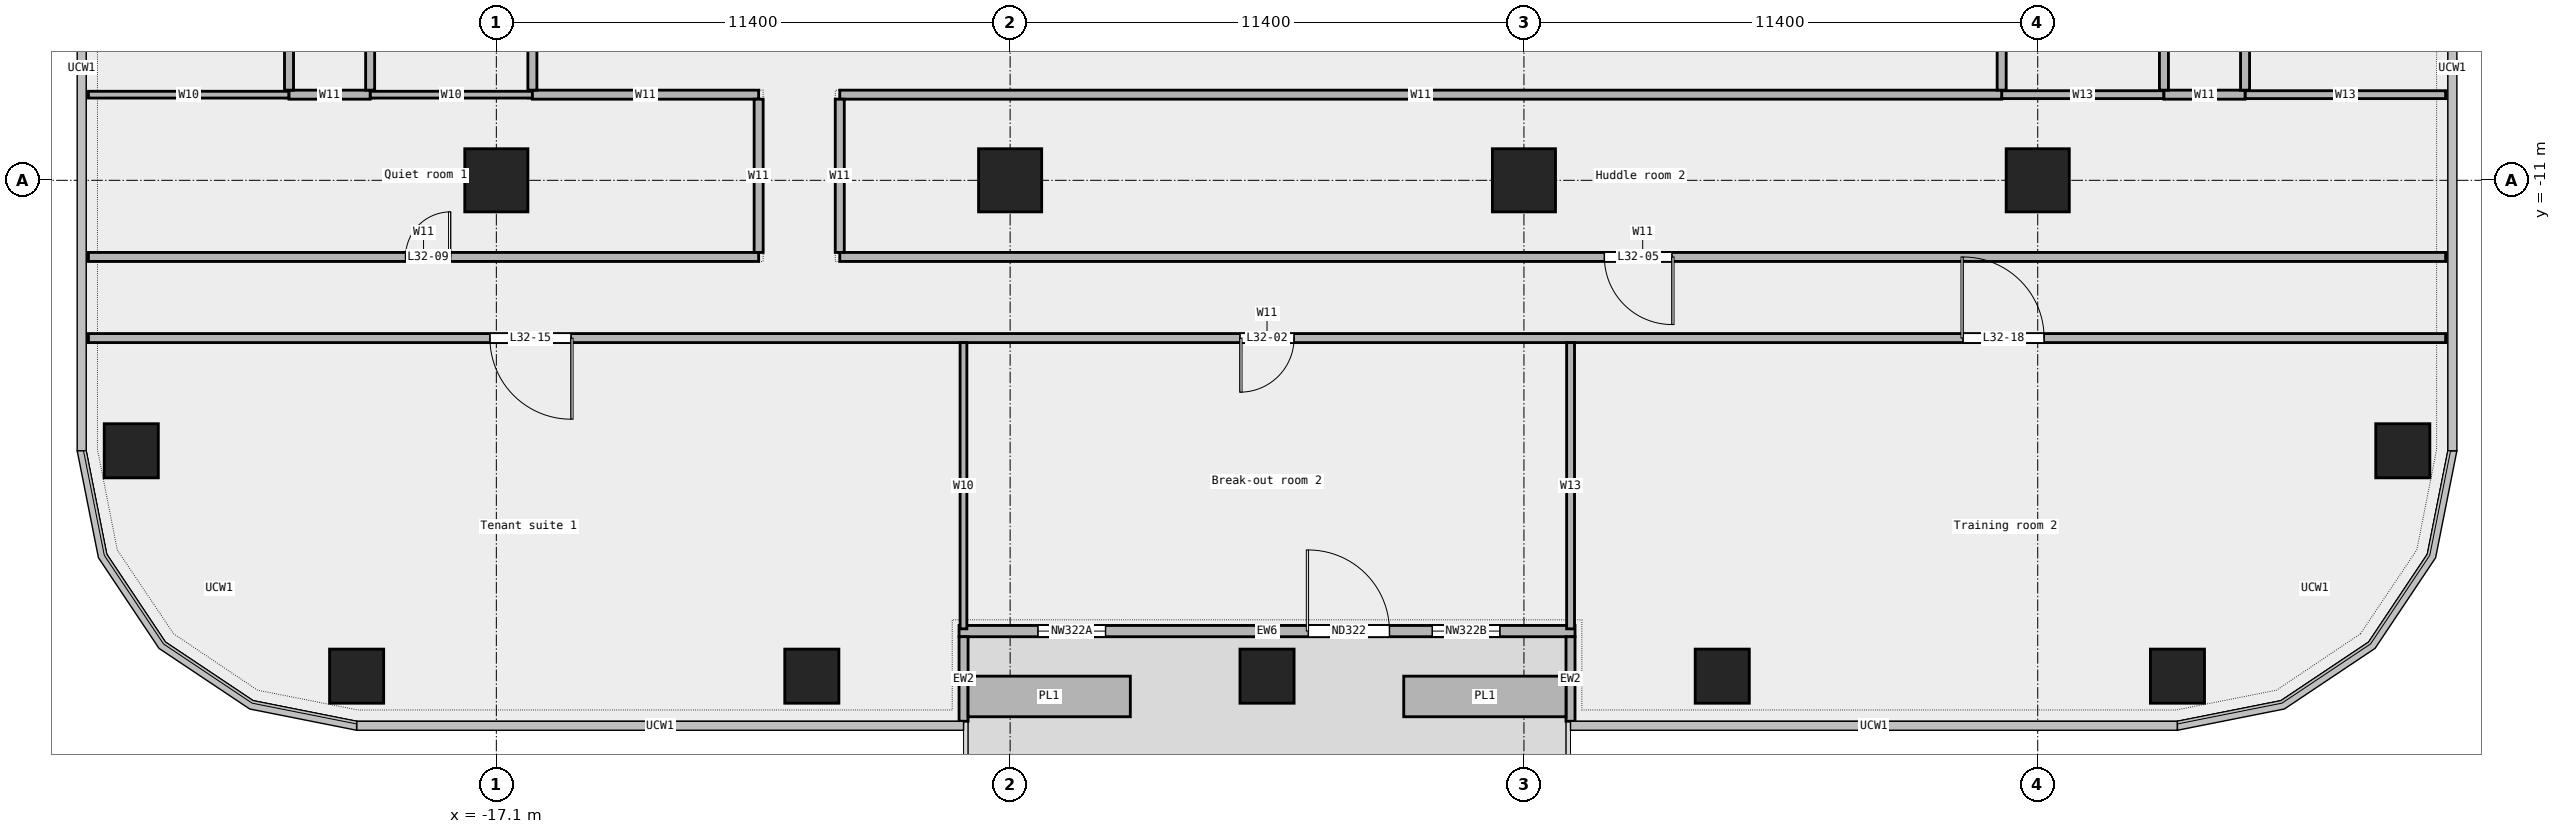
"""IFC4 building model, lengths in metres.
Left out: names, types, materials, properties, quantities, classifications, styles, units other than length and angle.
Written with IfcOpenShell. Run it as: python <this file> out.ifc"""

import sys

from ifc_helpers import new_model, si_unit, direction, frame, frame_2d, origin, origin_2d, place, context, subcontext, project, spatial, rectangle, extrude, element, fill, save


model = new_model("IFC4")
c1 = context("Model", 3, precision=1e-05, world=origin(), true_north=direction((0.0, 1.0)))
c2 = subcontext(c1, "Body", "Model", "MODEL_VIEW")
j1 = project(units=[si_unit("LENGTHUNIT", "METRE"), si_unit("PLANEANGLEUNIT", "RADIAN")], contexts=[c1])
p1 = place(None, origin())
s1 = spatial("IfcSite", under=j1, at=p1, CompositionType="ELEMENT")
p2 = place(p1, origin())
s2 = spatial("IfcBuilding", under=s1, at=p2, CompositionType="ELEMENT")
p3 = place(p2, frame((0.0, 0.0, 161.0)))
s3 = spatial("IfcBuildingStorey", under=s2, at=p3, CompositionType="ELEMENT", Elevation=161.0)
for number, where, z_axis, x_axis in (
    (1, (-20.2, -22.0, 0.0), (0.0, 0.0, 1.0), (1.0, 0.0, 0.0)),
    (2, (-10.1, -22.0, 0.0), (0.0, 0.0, 1.0), (1.0, 0.0, 0.0)),
    (3, (0.0, -22.0, 0.0), (0.0, 0.0, 1.0), (1.0, 0.0, 0.0)),
    (4, (10.1, -22.0, 0.0), (0.0, 0.0, 1.0), (1.0, 0.0, 0.0)),
    (5, (20.2, -22.0, 0.0), (0.0, 0.0, 1.0), (1.0, 0.0, 0.0)),
    (6, (25.2, -17.0, 0.0), (0.0, 0.0, 1.0), (1.0, 0.0, 0.0)),
    (7, (-25.2, -17.0, 0.0), (0.0, 0.0, 1.0), (1.0, 0.0, 0.0)),
):
    element("IfcColumn", number, at=place(p3, frame(where, z_axis=z_axis, x_axis=x_axis)), inside=s3, PredefinedType="COLUMN", context=c2, shape_type="SweptSolid", body=[
        extrude(rectangle(XDim=1.2, YDim=1.2, at=origin_2d()), origin(), (0.0, 0.0, 1.0), 3.6),
    ])
for number, where, z_axis, x_axis in (
    (8, (-17.1, -11.0, 0.0), (0.0, 0.0, 1.0), (1.0, 0.0, 0.0)),
    (9, (-5.7, -11.0, 0.0), (0.0, 0.0, 1.0), (1.0, 0.0, 0.0)),
    (10, (5.7, -11.0, 0.0), (0.0, 0.0, 1.0), (1.0, 0.0, 0.0)),
    (11, (17.1, -11.0, 0.0), (0.0, 0.0, 1.0), (1.0, 0.0, 0.0)),
):
    element("IfcColumn", number, at=place(p3, frame(where, z_axis=z_axis, x_axis=x_axis)), inside=s3, PredefinedType="COLUMN", context=c2, shape_type="SweptSolid", body=[
        extrude(rectangle(XDim=1.4, YDim=1.4, at=origin_2d()), origin(), (0.0, 0.0, 1.0), 3.6),
    ])
p4 = place(p3, frame((-6.833, -21.0, 0.0), z_axis=(0.0, 0.0, 1.0), x_axis=(1.0, 0.0, 0.0)))
e12 = element("IfcWall", 12, at=p4, inside=s3, PredefinedType="STANDARD", context=c2, shape_type="SweptSolid", body=[
    extrude(rectangle(XDim=13.667, YDim=0.25, at=frame_2d((6.833, 0.0))), origin(), (0.0, 0.0, 1.0), 3.6),
])
p5 = place(p4, frame((1.75, 0.0, 0.45)))
e13 = element("IfcOpeningElement", 13, at=p5, cuts=e12, PredefinedType="OPENING", context=c2, shape_type="SweptSolid", body=[
    extrude(rectangle(XDim=1.5, YDim=2.4, at=frame_2d((0.75, 1.2))), frame((0.0, 0.137, 0.0), z_axis=(0.0, -1.0, 0.0), x_axis=(1.0, 0.0, 0.0)), (0.0, 0.0, 1.0), 0.274),
])
p6 = place(p4, frame((7.75, 0.0, 0.0)))
e14 = element("IfcOpeningElement", 14, at=p6, cuts=e12, PredefinedType="OPENING", context=c2, shape_type="SweptSolid", body=[
    extrude(rectangle(XDim=1.8, YDim=2.4, at=frame_2d((0.9, 1.2))), frame((0.0, 0.137, 0.0), z_axis=(0.0, -1.0, 0.0), x_axis=(1.0, 0.0, 0.0)), (0.0, 0.0, 1.0), 0.274),
])
p7 = place(p4, frame((10.5, 0.0, 0.45)))
e15 = element("IfcOpeningElement", 15, at=p7, cuts=e12, PredefinedType="OPENING", context=c2, shape_type="SweptSolid", body=[
    extrude(rectangle(XDim=1.5, YDim=2.4, at=frame_2d((0.75, 1.2))), frame((0.0, 0.137, 0.0), z_axis=(0.0, -1.0, 0.0), x_axis=(1.0, 0.0, 0.0)), (0.0, 0.0, 1.0), 0.274),
])
for number, where, z_axis, x_axis in (
    (16, (-6.733, -23.0, 0.0), (0.0, 0.0, 1.0), (0.0, 1.0, 0.0)),
    (17, (6.733, -23.0, 0.0), (0.0, 0.0, 1.0), (0.0, 1.0, 0.0)),
):
    element("IfcWall", number, at=place(p3, frame(where, z_axis=z_axis, x_axis=x_axis)), inside=s3, PredefinedType="STANDARD", context=c2, shape_type="SweptSolid", body=[
        extrude(rectangle(XDim=1.875, YDim=0.2, at=frame_2d((0.938, 0.0))), origin(), (0.0, 0.0, 1.0), 3.6),
    ])
for number, where, z_axis, x_axis in (
    (18, (-6.633, -22.45, 0.0), (0.0, 0.0, 1.0), (1.0, 0.0, 0.0)),
    (19, (3.033, -22.45, 0.0), (0.0, 0.0, 1.0), (1.0, 0.0, 0.0)),
):
    element("IfcWall", number, at=place(p3, frame(where, z_axis=z_axis, x_axis=x_axis)), inside=s3, PredefinedType="STANDARD", context=c2, shape_type="SweptSolid", body=[
        extrude(rectangle(XDim=3.6, YDim=0.9, at=frame_2d((1.8, 0.0))), origin(), (0.0, 0.0, 1.0), 0.7),
    ])
p8 = place(p3, frame((-26.15, -14.5, 0.0), z_axis=(0.0, 0.0, 1.0), x_axis=(1.0, 0.0, 0.0)))
e20 = element("IfcWall", 20, at=p8, inside=s3, PredefinedType="PARTITIONING", context=c2, shape_type="SweptSolid", body=[
    extrude(rectangle(XDim=52.3, YDim=0.2, at=frame_2d((26.15, 0.0))), origin(), (0.0, 0.0, 1.0), 3.6),
])
p9 = place(p8, frame((25.55, 0.0, 0.0)))
e21 = element("IfcOpeningElement", 21, at=p9, cuts=e20, PredefinedType="OPENING", context=c2, shape_type="SweptSolid", body=[
    extrude(rectangle(XDim=1.2, YDim=2.1, at=frame_2d((0.6, 1.05))), frame((0.0, 0.112, 0.0), z_axis=(0.0, -1.0, 0.0), x_axis=(1.0, 0.0, 0.0)), (0.0, 0.0, 1.0), 0.224),
])
p10 = place(p8, frame((8.907, 0.0, 0.0)))
e22 = element("IfcOpeningElement", 22, at=p10, cuts=e20, PredefinedType="OPENING", context=c2, shape_type="SweptSolid", body=[
    extrude(rectangle(XDim=1.8, YDim=2.1, at=frame_2d((0.9, 1.05))), frame((0.0, 0.112, 0.0), z_axis=(0.0, -1.0, 0.0), x_axis=(1.0, 0.0, 0.0)), (0.0, 0.0, 1.0), 0.224),
])
p11 = place(p8, frame((41.593, 0.0, 0.0)))
e23 = element("IfcOpeningElement", 23, at=p11, cuts=e20, PredefinedType="OPENING", context=c2, shape_type="SweptSolid", body=[
    extrude(rectangle(XDim=1.8, YDim=2.1, at=frame_2d((0.9, 1.05))), frame((0.0, 0.112, 0.0), z_axis=(0.0, -1.0, 0.0), x_axis=(1.0, 0.0, 0.0)), (0.0, 0.0, 1.0), 0.224),
])
p12 = place(p3, frame((-26.15, -12.7, 0.0), z_axis=(0.0, 0.0, 1.0), x_axis=(1.0, 0.0, 0.0)))
e24 = element("IfcWall", 24, at=p12, inside=s3, PredefinedType="PARTITIONING", context=c2, shape_type="SweptSolid", body=[
    extrude(rectangle(XDim=14.87, YDim=0.2, at=frame_2d((7.435, 0.0))), origin(), (0.0, 0.0, 1.0), 3.6),
])
p13 = place(p12, frame((7.035, 0.0, 0.0)))
e25 = element("IfcOpeningElement", 25, at=p13, cuts=e24, PredefinedType="OPENING", context=c2, shape_type="SweptSolid", body=[
    extrude(rectangle(XDim=1.0, YDim=2.1, at=frame_2d((0.5, 1.05))), frame((0.0, 0.112, 0.0), z_axis=(0.0, -1.0, 0.0), x_axis=(1.0, 0.0, 0.0)), (0.0, 0.0, 1.0), 0.224),
])
p14 = place(p3, frame((-9.48, -12.7, 0.0), z_axis=(0.0, 0.0, 1.0), x_axis=(1.0, 0.0, 0.0)))
e26 = element("IfcWall", 26, at=p14, inside=s3, PredefinedType="PARTITIONING", context=c2, shape_type="SweptSolid", body=[
    extrude(rectangle(XDim=35.63, YDim=0.2, at=frame_2d((17.815, 0.0))), origin(), (0.0, 0.0, 1.0), 3.6),
])
p15 = place(p14, frame((16.965, 0.0, 0.0)))
e27 = element("IfcOpeningElement", 27, at=p15, cuts=e26, PredefinedType="OPENING", context=c2, shape_type="SweptSolid", body=[
    extrude(rectangle(XDim=1.5, YDim=2.1, at=frame_2d((0.75, 1.05))), frame((0.0, 0.112, 0.0), z_axis=(0.0, -1.0, 0.0), x_axis=(1.0, 0.0, 0.0)), (0.0, 0.0, 1.0), 0.224),
])
p16 = place(p3, frame((-26.15, -9.1, 0.0), z_axis=(0.0, 0.0, 1.0), x_axis=(1.0, 0.0, 0.0)))
e28 = element("IfcWall", 28, at=p16, inside=s3, PredefinedType="PARTITIONING", context=c2, shape_type="SweptSolid", body=[
    extrude(rectangle(XDim=4.45, YDim=0.15, at=frame_2d((2.225, 0.0))), origin(), (0.0, 0.0, 1.0), 3.6),
])
p17 = place(p3, frame((-19.9, -9.1, 0.0), z_axis=(0.0, 0.0, 1.0), x_axis=(1.0, 0.0, 0.0)))
e29 = element("IfcWall", 29, at=p17, inside=s3, PredefinedType="PARTITIONING", context=c2, shape_type="SweptSolid", body=[
    extrude(rectangle(XDim=3.6, YDim=0.15, at=frame_2d((1.8, 0.0))), origin(), (0.0, 0.0, 1.0), 3.6),
])
p18 = place(p3, frame((16.3, -9.1, 0.0), z_axis=(0.0, 0.0, 1.0), x_axis=(1.0, 0.0, 0.0)))
e30 = element("IfcWall", 30, at=p18, inside=s3, PredefinedType="PARTITIONING", context=c2, shape_type="SweptSolid", body=[
    extrude(rectangle(XDim=3.6, YDim=0.175, at=frame_2d((1.8, 0.0))), origin(), (0.0, 0.0, 1.0), 3.6),
])
p19 = place(p3, frame((21.7, -9.1, 0.0), z_axis=(0.0, 0.0, 1.0), x_axis=(1.0, 0.0, 0.0)))
e31 = element("IfcWall", 31, at=p19, inside=s3, PredefinedType="PARTITIONING", context=c2, shape_type="SweptSolid", body=[
    extrude(rectangle(XDim=4.45, YDim=0.175, at=frame_2d((2.225, 0.0))), origin(), (0.0, 0.0, 1.0), 3.6),
])
p20 = place(p3, frame((-21.7, -9.1, 0.0), z_axis=(0.0, 0.0, 1.0), x_axis=(1.0, 0.0, 0.0)))
e32 = element("IfcWall", 32, at=p20, inside=s3, PredefinedType="PARTITIONING", context=c2, shape_type="SweptSolid", body=[
    extrude(rectangle(XDim=1.8, YDim=0.2, at=frame_2d((0.9, 0.0))), origin(), (0.0, 0.0, 1.0), 3.6),
])
p21 = place(p3, frame((-16.3, -9.1, 0.0), z_axis=(0.0, 0.0, 1.0), x_axis=(1.0, 0.0, 0.0)))
e33 = element("IfcWall", 33, at=p21, inside=s3, PredefinedType="PARTITIONING", context=c2, shape_type="SweptSolid", body=[
    extrude(rectangle(XDim=5.02, YDim=0.2, at=frame_2d((2.51, 0.0))), origin(), (0.0, 0.0, 1.0), 3.6),
])
p22 = place(p3, frame((-9.48, -9.1, 0.0), z_axis=(0.0, 0.0, 1.0), x_axis=(1.0, 0.0, 0.0)))
e34 = element("IfcWall", 34, at=p22, inside=s3, PredefinedType="PARTITIONING", context=c2, shape_type="SweptSolid", body=[
    extrude(rectangle(XDim=25.78, YDim=0.2, at=frame_2d((12.89, 0.0))), origin(), (0.0, 0.0, 1.0), 3.6),
])
p23 = place(p3, frame((19.9, -9.1, 0.0), z_axis=(0.0, 0.0, 1.0), x_axis=(1.0, 0.0, 0.0)))
e35 = element("IfcWall", 35, at=p23, inside=s3, PredefinedType="PARTITIONING", context=c2, shape_type="SweptSolid", body=[
    extrude(rectangle(XDim=1.8, YDim=0.2, at=frame_2d((0.9, 0.0))), origin(), (0.0, 0.0, 1.0), 3.6),
])
p24 = place(p3, frame((-21.7, -9.0, 0.0), z_axis=(0.0, 0.0, 1.0), x_axis=(0.0, 1.0, 0.0)))
e36 = element("IfcWall", 36, at=p24, inside=s3, PredefinedType="PARTITIONING", context=c2, shape_type="SweptSolid", body=[
    extrude(rectangle(XDim=24.3, YDim=0.2, at=frame_2d((12.15, 0.0))), origin(), (0.0, 0.0, 1.0), 3.6),
])
p25 = place(p24, frame((14.925, 0.0, 0.0)))
e37 = element("IfcOpeningElement", 37, at=p25, cuts=e36, PredefinedType="OPENING", context=c2, shape_type="SweptSolid", body=[
    extrude(rectangle(XDim=0.9, YDim=2.1, at=frame_2d((0.45, 1.05))), frame((0.0, 0.112, 0.0), z_axis=(0.0, -1.0, 0.0), x_axis=(1.0, 0.0, 0.0)), (0.0, 0.0, 1.0), 0.224),
])
p26 = place(p24, frame((4.05, 0.0, 0.0)))
e38 = element("IfcOpeningElement", 38, at=p26, cuts=e36, PredefinedType="OPENING", context=c2, shape_type="SweptSolid", body=[
    extrude(rectangle(XDim=0.9, YDim=2.1, at=frame_2d((0.45, 1.05))), frame((0.0, 0.112, 0.0), z_axis=(0.0, -1.0, 0.0), x_axis=(1.0, 0.0, 0.0)), (0.0, 0.0, 1.0), 0.224),
])
p27 = place(p3, frame((-19.9, -9.0, 0.0), z_axis=(0.0, 0.0, 1.0), x_axis=(0.0, 1.0, 0.0)))
e39 = element("IfcWall", 39, at=p27, inside=s3, PredefinedType="PARTITIONING", context=c2, shape_type="SweptSolid", body=[
    extrude(rectangle(XDim=11.15, YDim=0.2, at=frame_2d((5.575, 0.0))), origin(), (0.0, 0.0, 1.0), 3.6),
])
p28 = place(p3, frame((-16.3, -9.0, 0.0), z_axis=(0.0, 0.0, 1.0), x_axis=(0.0, 1.0, 0.0)))
e40 = element("IfcWall", 40, at=p28, inside=s3, PredefinedType="PARTITIONING", context=c2, shape_type="SweptSolid", body=[
    extrude(rectangle(XDim=8.3, YDim=0.2, at=frame_2d((4.15, 0.0))), origin(), (0.0, 0.0, 1.0), 3.6),
])
p29 = place(p28, frame((6.823, 0.0, 0.0)))
e41 = element("IfcOpeningElement", 41, at=p29, cuts=e40, PredefinedType="OPENING", context=c2, shape_type="SweptSolid", body=[
    extrude(rectangle(XDim=0.9, YDim=2.1, at=frame_2d((0.45, 1.05))), frame((0.0, 0.112, 0.0), z_axis=(0.0, -1.0, 0.0), x_axis=(1.0, 0.0, 0.0)), (0.0, 0.0, 1.0), 0.224),
])
p30 = place(p28, frame((2.673, 0.0, 0.0)))
e42 = element("IfcOpeningElement", 42, at=p30, cuts=e40, PredefinedType="OPENING", context=c2, shape_type="SweptSolid", body=[
    extrude(rectangle(XDim=0.9, YDim=2.1, at=frame_2d((0.45, 1.05))), frame((0.0, 0.112, 0.0), z_axis=(0.0, -1.0, 0.0), x_axis=(1.0, 0.0, 0.0)), (0.0, 0.0, 1.0), 0.224),
])
for number, where, z_axis, x_axis in (
    (43, (-11.28, -12.6, 0.0), (0.0, 0.0, 1.0), (0.0, 1.0, 0.0)),
    (44, (-9.48, -12.6, 0.0), (0.0, 0.0, 1.0), (0.0, 1.0, 0.0)),
):
    element("IfcWall", number, at=place(p3, frame(where, z_axis=z_axis, x_axis=x_axis)), inside=s3, PredefinedType="PARTITIONING", context=c2, shape_type="SweptSolid", body=[
        extrude(rectangle(XDim=3.4, YDim=0.2, at=frame_2d((1.7, 0.0))), origin(), (0.0, 0.0, 1.0), 3.6),
    ])
p31 = place(p3, frame((-6.735, -20.95, 0.0), z_axis=(0.0, 0.0, 1.0), x_axis=(0.0, 1.0, 0.0)))
e45 = element("IfcWall", 45, at=p31, inside=s3, PredefinedType="PARTITIONING", context=c2, shape_type="SweptSolid", body=[
    extrude(rectangle(XDim=6.35, YDim=0.15, at=frame_2d((3.175, 0.0))), origin(), (0.0, 0.0, 1.0), 3.6),
])
p32 = place(p3, frame((6.735, -20.95, 0.0), z_axis=(0.0, 0.0, 1.0), x_axis=(0.0, 1.0, 0.0)))
e46 = element("IfcWall", 46, at=p32, inside=s3, PredefinedType="PARTITIONING", context=c2, shape_type="SweptSolid", body=[
    extrude(rectangle(XDim=6.35, YDim=0.175, at=frame_2d((3.175, 0.0))), origin(), (0.0, 0.0, 1.0), 3.6),
])
p33 = place(p3, frame((16.3, -9.0, 0.0), z_axis=(0.0, 0.0, 1.0), x_axis=(0.0, 1.0, 0.0)))
e47 = element("IfcWall", 47, at=p33, inside=s3, PredefinedType="PARTITIONING", context=c2, shape_type="SweptSolid", body=[
    extrude(rectangle(XDim=8.3, YDim=0.2, at=frame_2d((4.15, 0.0))), origin(), (0.0, 0.0, 1.0), 3.6),
])
p34 = place(p3, frame((19.9, -9.0, 0.0), z_axis=(0.0, 0.0, 1.0), x_axis=(0.0, 1.0, 0.0)))
e48 = element("IfcWall", 48, at=p34, inside=s3, PredefinedType="PARTITIONING", context=c2, shape_type="SweptSolid", body=[
    extrude(rectangle(XDim=13.6, YDim=0.2, at=frame_2d((6.8, 0.0))), origin(), (0.0, 0.0, 1.0), 3.6),
])
p35 = place(p34, frame((3.442, 0.0, 0.0)))
e49 = element("IfcOpeningElement", 49, at=p35, cuts=e48, PredefinedType="OPENING", context=c2, shape_type="SweptSolid", body=[
    extrude(rectangle(XDim=0.9, YDim=2.1, at=frame_2d((0.45, 1.05))), frame((0.0, 0.112, 0.0), z_axis=(0.0, -1.0, 0.0), x_axis=(1.0, 0.0, 0.0)), (0.0, 0.0, 1.0), 0.224),
])
p36 = place(p34, frame((10.242, 0.0, 0.0)))
e50 = element("IfcOpeningElement", 50, at=p36, cuts=e48, PredefinedType="OPENING", context=c2, shape_type="SweptSolid", body=[
    extrude(rectangle(XDim=0.9, YDim=2.1, at=frame_2d((0.45, 1.05))), frame((0.0, 0.112, 0.0), z_axis=(0.0, -1.0, 0.0), x_axis=(1.0, 0.0, 0.0)), (0.0, 0.0, 1.0), 0.224),
])
p37 = place(p3, frame((21.7, -9.0, 0.0), z_axis=(0.0, 0.0, 1.0), x_axis=(0.0, 1.0, 0.0)))
e51 = element("IfcWall", 51, at=p37, inside=s3, PredefinedType="PARTITIONING", context=c2, shape_type="SweptSolid", body=[
    extrude(rectangle(XDim=24.3, YDim=0.2, at=frame_2d((12.15, 0.0))), origin(), (0.0, 0.0, 1.0), 3.6),
])
p38 = place(p37, frame((14.925, 0.0, 0.0)))
e52 = element("IfcOpeningElement", 52, at=p38, cuts=e51, PredefinedType="OPENING", context=c2, shape_type="SweptSolid", body=[
    extrude(rectangle(XDim=0.9, YDim=2.1, at=frame_2d((0.45, 1.05))), frame((0.0, 0.112, 0.0), z_axis=(0.0, -1.0, 0.0), x_axis=(1.0, 0.0, 0.0)), (0.0, 0.0, 1.0), 0.224),
])
p39 = place(p37, frame((2.562, 0.0, 0.0)))
e53 = element("IfcOpeningElement", 53, at=p39, cuts=e51, PredefinedType="OPENING", context=c2, shape_type="SweptSolid", body=[
    extrude(rectangle(XDim=0.9, YDim=2.1, at=frame_2d((0.45, 1.05))), frame((0.0, 0.112, 0.0), z_axis=(0.0, -1.0, 0.0), x_axis=(1.0, 0.0, 0.0)), (0.0, 0.0, 1.0), 0.224),
])
p40 = place(p5, origin())
e54 = element("IfcWindow", 54, at=p40, inside=s3, PartitioningType="SINGLE_PANEL", PredefinedType="WINDOW", context=c2, shape_type="SweptSolid", body=[
    extrude(rectangle(XDim=1.5, YDim=2.4, at=frame_2d((0.75, 1.2))), frame((0.0, 0.03, 0.0), z_axis=(0.0, -1.0, 0.0), x_axis=(1.0, 0.0, 0.0)), (0.0, 0.0, 1.0), 0.06),
])
fill(e13, e54)
p41 = place(p6, origin())
e55 = element("IfcDoor", 55, at=p41, inside=s3, OperationType="DOUBLE_DOOR_SINGLE_SWING", PredefinedType="DOOR", context=c2, shape_type="SweptSolid", body=[
    extrude(rectangle(XDim=1.8, YDim=2.4, at=frame_2d((0.9, 1.2))), frame((0.0, 0.025, 0.0), z_axis=(0.0, -1.0, 0.0), x_axis=(1.0, 0.0, 0.0)), (0.0, 0.0, 1.0), 0.05),
])
fill(e14, e55)
p42 = place(p7, origin())
e56 = element("IfcWindow", 56, at=p42, inside=s3, PartitioningType="SINGLE_PANEL", PredefinedType="WINDOW", context=c2, shape_type="SweptSolid", body=[
    extrude(rectangle(XDim=1.5, YDim=2.4, at=frame_2d((0.75, 1.2))), frame((0.0, 0.03, 0.0), z_axis=(0.0, -1.0, 0.0), x_axis=(1.0, 0.0, 0.0)), (0.0, 0.0, 1.0), 0.06),
])
fill(e15, e56)
p43 = place(p9, origin())
e57 = element("IfcDoor", 57, at=p43, inside=s3, OperationType="SINGLE_SWING_RIGHT", PredefinedType="DOOR", context=c2, shape_type="SweptSolid", body=[
    extrude(rectangle(XDim=1.2, YDim=2.1, at=frame_2d((0.6, 1.05))), frame((0.0, 0.025, 0.0), z_axis=(0.0, -1.0, 0.0), x_axis=(1.0, 0.0, 0.0)), (0.0, 0.0, 1.0), 0.05),
])
fill(e21, e57)
p44 = place(p15, origin())
e58 = element("IfcDoor", 58, at=p44, inside=s3, OperationType="DOUBLE_DOOR_SINGLE_SWING", PredefinedType="DOOR", context=c2, shape_type="SweptSolid", body=[
    extrude(rectangle(XDim=1.5, YDim=2.1, at=frame_2d((0.75, 1.05))), frame((0.0, 0.025, 0.0), z_axis=(0.0, -1.0, 0.0), x_axis=(1.0, 0.0, 0.0)), (0.0, 0.0, 1.0), 0.05),
])
fill(e27, e58)
p45 = place(p13, origin())
e59 = element("IfcDoor", 59, at=p45, inside=s3, OperationType="SINGLE_SWING_RIGHT", PredefinedType="DOOR", context=c2, shape_type="SweptSolid", body=[
    extrude(rectangle(XDim=1.0, YDim=2.1, at=frame_2d((0.5, 1.05))), frame((0.0, 0.025, 0.0), z_axis=(0.0, -1.0, 0.0), x_axis=(1.0, 0.0, 0.0)), (0.0, 0.0, 1.0), 0.05),
])
fill(e25, e59)
p46 = place(p10, origin())
e60 = element("IfcDoor", 60, at=p46, inside=s3, OperationType="DOUBLE_DOOR_SINGLE_SWING", PredefinedType="DOOR", context=c2, shape_type="SweptSolid", body=[
    extrude(rectangle(XDim=1.8, YDim=2.1, at=frame_2d((0.9, 1.05))), frame((0.0, 0.025, 0.0), z_axis=(0.0, -1.0, 0.0), x_axis=(1.0, 0.0, 0.0)), (0.0, 0.0, 1.0), 0.05),
])
fill(e22, e60)
p47 = place(p11, origin())
e61 = element("IfcDoor", 61, at=p47, inside=s3, OperationType="DOUBLE_DOOR_SINGLE_SWING", PredefinedType="DOOR", context=c2, shape_type="SweptSolid", body=[
    extrude(rectangle(XDim=1.8, YDim=2.1, at=frame_2d((0.9, 1.05))), frame((0.0, 0.025, 0.0), z_axis=(0.0, -1.0, 0.0), x_axis=(1.0, 0.0, 0.0)), (0.0, 0.0, 1.0), 0.05),
])
fill(e23, e61)
save(model, sys.argv[1])
